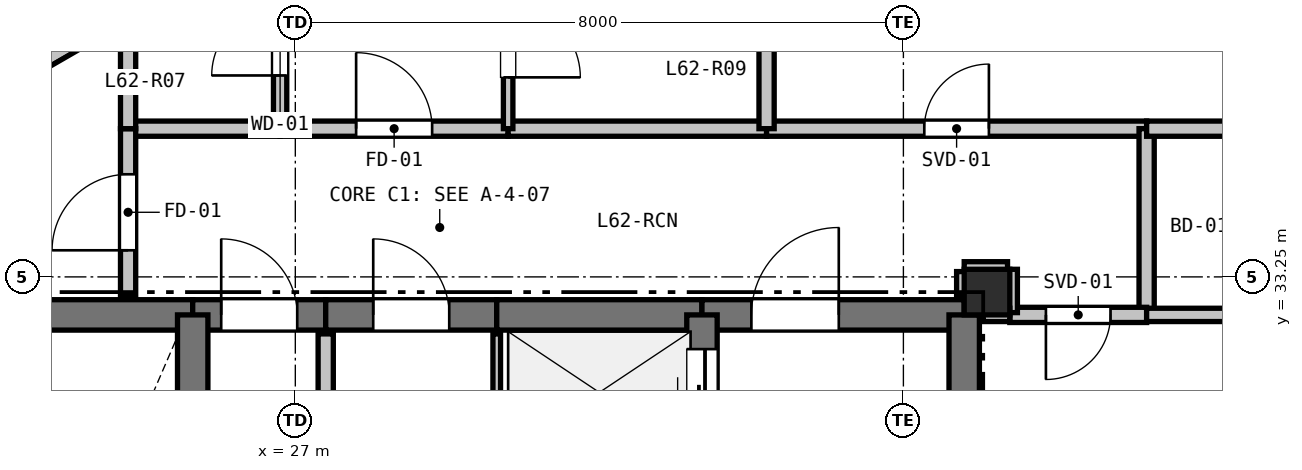
"""IFC4 building model, lengths in metres.
Left out: names, types, materials, properties, quantities, classifications, styles, units other than length and angle.
Written with IfcOpenShell. Run it as: python <this file> out.ifc"""

import sys

from ifc_helpers import new_model, si_unit, direction, frame, frame_2d, origin, origin_2d, place, context, subcontext, project, spatial, rectangle, extrude, element, fill, save


model = new_model("IFC4")
c1 = context("Model", 3, precision=1e-05, world=origin(), true_north=direction((0.0, 1.0)))
c2 = subcontext(c1, "Body", "Model", "MODEL_VIEW")
j1 = project(units=[si_unit("LENGTHUNIT", "METRE"), si_unit("PLANEANGLEUNIT", "RADIAN")], contexts=[c1])
p1 = place(None, origin())
s1 = spatial("IfcSite", under=j1, at=p1, CompositionType="ELEMENT")
p2 = place(p1, origin())
s2 = spatial("IfcBuilding", under=s1, at=p2, CompositionType="ELEMENT")
p3 = place(p2, frame((0.0, 0.0, 223.2)))
s3 = spatial("IfcBuildingStorey", under=s2, at=p3, CompositionType="ELEMENT", Elevation=223.2)
p4 = place(p3, frame((36.1, 33.05, 0.0), z_axis=(0.0, 0.0, 1.0), x_axis=(1.0, 0.0, 0.0)))
e1 = element("IfcColumn", 1, at=p4, inside=s3, PredefinedType="COLUMN", context=c2, shape_type="SweptSolid", body=[
    extrude(rectangle(XDim=0.6, YDim=0.6, at=origin_2d()), origin(), (0.0, 0.0, 1.0), 3.3),
])
p5 = place(p3, frame((20.066, 33.997, 0.0), z_axis=(0.0, 0.0, 1.0), x_axis=(0.866019557082, 0.500010126649, 0.0)))
e2 = element("IfcWall", 2, at=p5, inside=s3, PredefinedType="PARAPET", context=c2, shape_type="SweptSolid", body=[
    extrude(rectangle(XDim=8.228, YDim=0.2, at=frame_2d((4.114, 0.0))), origin(), (0.0, 0.0, 1.0), 0.2),
])
p6 = place(p3, frame((22.2, 32.75, 0.0), z_axis=(0.0, 0.0, 1.0), x_axis=(1.0, 0.0, 0.0)))
e3 = element("IfcWall", 3, at=p6, inside=s3, PredefinedType="SHEAR", context=c2, shape_type="SweptSolid", body=[
    extrude(rectangle(XDim=3.45, YDim=0.4, at=frame_2d((1.725, 0.0))), origin(), (0.0, 0.0, 1.0), 3.08),
])
p7 = place(p3, frame((25.65, 32.75, 0.0), z_axis=(0.0, 0.0, 1.0), x_axis=(1.0, 0.0, 0.0)))
e4 = element("IfcWall", 4, at=p7, inside=s3, PredefinedType="SHEAR", context=c2, shape_type="SweptSolid", body=[
    extrude(rectangle(XDim=1.75, YDim=0.4, at=frame_2d((0.875, 0.0))), origin(), (0.0, 0.0, 1.0), 3.08),
])
p8 = place(p7, frame((0.375, 0.0, 0.0)))
e5 = element("IfcOpeningElement", 5, at=p8, cuts=e4, PredefinedType="OPENING", context=c2, shape_type="SweptSolid", body=[
    extrude(rectangle(XDim=1.0, YDim=2.15, at=frame_2d((0.5, 1.075))), frame((0.0, 0.21, 0.0), z_axis=(0.0, -1.0, 0.0), x_axis=(1.0, 0.0, 0.0)), (0.0, 0.0, 1.0), 0.42),
])
p9 = place(p3, frame((27.4, 32.75, 0.0), z_axis=(0.0, 0.0, 1.0), x_axis=(1.0, 0.0, 0.0)))
e6 = element("IfcWall", 6, at=p9, inside=s3, PredefinedType="SHEAR", context=c2, shape_type="SweptSolid", body=[
    extrude(rectangle(XDim=2.25, YDim=0.4, at=frame_2d((1.125, 0.0))), origin(), (0.0, 0.0, 1.0), 3.08),
])
p10 = place(p9, frame((0.625, 0.0, 0.0)))
e7 = element("IfcOpeningElement", 7, at=p10, cuts=e6, PredefinedType="OPENING", context=c2, shape_type="SweptSolid", body=[
    extrude(rectangle(XDim=1.0, YDim=2.15, at=frame_2d((0.5, 1.075))), frame((0.0, 0.21, 0.0), z_axis=(0.0, -1.0, 0.0), x_axis=(1.0, 0.0, 0.0)), (0.0, 0.0, 1.0), 0.42),
])
p11 = place(p3, frame((29.65, 32.75, 0.0), z_axis=(0.0, 0.0, 1.0), x_axis=(1.0, 0.0, 0.0)))
e8 = element("IfcWall", 8, at=p11, inside=s3, PredefinedType="SHEAR", context=c2, shape_type="SweptSolid", body=[
    extrude(rectangle(XDim=2.7, YDim=0.4, at=frame_2d((1.35, 0.0))), origin(), (0.0, 0.0, 1.0), 3.08),
])
p12 = place(p3, frame((32.35, 32.75, 0.0), z_axis=(0.0, 0.0, 1.0), x_axis=(1.0, 0.0, 0.0)))
e9 = element("IfcWall", 9, at=p12, inside=s3, PredefinedType="SHEAR", context=c2, shape_type="SweptSolid", body=[
    extrude(rectangle(XDim=3.45, YDim=0.4, at=frame_2d((1.725, 0.0))), origin(), (0.0, 0.0, 1.0), 3.08),
])
p13 = place(p12, frame((0.65, 0.0, 0.0)))
e10 = element("IfcOpeningElement", 10, at=p13, cuts=e9, PredefinedType="OPENING", context=c2, shape_type="SweptSolid", body=[
    extrude(rectangle(XDim=1.15, YDim=2.15, at=frame_2d((0.575, 1.075))), frame((0.0, 0.21, 0.0), z_axis=(0.0, -1.0, 0.0), x_axis=(1.0, 0.0, 0.0)), (0.0, 0.0, 1.0), 0.42),
])
p14 = place(p3, frame((35.8, 32.75, 0.0), z_axis=(0.0, 0.0, 1.0), x_axis=(0.0, -1.0, 0.0)))
e11 = element("IfcWall", 11, at=p14, inside=s3, PredefinedType="SHEAR", context=c2, shape_type="SweptSolid", body=[
    extrude(rectangle(XDim=4.65, YDim=0.4, at=frame_2d((2.325, 0.0))), origin(), (0.0, 0.0, 1.0), 3.08),
])
p15 = place(p3, frame((25.65, 27.95, 0.0), z_axis=(0.0, 0.0, 1.0), x_axis=(0.0, 1.0, 0.0)))
e12 = element("IfcWall", 12, at=p15, inside=s3, PredefinedType="SHEAR", context=c2, shape_type="SweptSolid", body=[
    extrude(rectangle(XDim=4.8, YDim=0.4, at=frame_2d((2.4, 0.0))), origin(), (0.0, 0.0, 1.0), 3.08),
])
p16 = place(p3, frame((32.35, 30.75, 0.0), z_axis=(0.0, 0.0, 1.0), x_axis=(0.0, 1.0, 0.0)))
e13 = element("IfcWall", 13, at=p16, inside=s3, PredefinedType="SHEAR", context=c2, shape_type="SweptSolid", body=[
    extrude(rectangle(XDim=2.0, YDim=0.4, at=frame_2d((1.0, 0.0))), origin(), (0.0, 0.0, 1.0), 3.08),
])
p17 = place(p16, frame((0.45, 0.0, 0.0)))
e14 = element("IfcOpeningElement", 14, at=p17, cuts=e13, PredefinedType="OPENING", context=c2, shape_type="SweptSolid", body=[
    extrude(rectangle(XDim=1.1, YDim=2.15, at=frame_2d((0.55, 1.075))), frame((0.0, 0.21, 0.0), z_axis=(0.0, -1.0, 0.0), x_axis=(1.0, 0.0, 0.0)), (0.0, 0.0, 1.0), 0.42),
])
p18 = place(p3, frame((29.65, 30.3, 0.0), z_axis=(0.0, 0.0, 1.0), x_axis=(0.0, 1.0, 0.0)))
e15 = element("IfcWall", 15, at=p18, inside=s3, PredefinedType="PARTITIONING", context=c2, shape_type="SweptSolid", body=[
    extrude(rectangle(XDim=2.2, YDim=0.1, at=frame_2d((1.1, 0.0))), origin(), (0.0, 0.0, 1.0), 3.08),
])
p19 = place(p3, frame((27.4, 32.5, 0.0), z_axis=(0.0, 0.0, 1.0), x_axis=(0.0, -1.0, 0.0)))
e16 = element("IfcWall", 16, at=p19, inside=s3, PredefinedType="PARTITIONING", context=c2, shape_type="SweptSolid", body=[
    extrude(rectangle(XDim=4.55, YDim=0.2, at=frame_2d((2.275, 0.0))), origin(), (0.0, 0.0, 1.0), 3.08),
])
p20 = place(p19, frame((1.775, 0.0, 0.0)))
e17 = element("IfcOpeningElement", 17, at=p20, cuts=e16, PredefinedType="OPENING", context=c2, shape_type="SweptSolid", body=[
    extrude(rectangle(XDim=1.0, YDim=2.15, at=frame_2d((0.5, 1.075))), frame((0.0, 0.11, 0.0), z_axis=(0.0, -1.0, 0.0), x_axis=(1.0, 0.0, 0.0)), (0.0, 0.0, 1.0), 0.22),
])
p21 = place(p3, frame((24.8, 35.2, 0.0), z_axis=(0.0, 0.0, 1.0), x_axis=(1.0, 0.0, 0.0)))
e18 = element("IfcWall", 18, at=p21, inside=s3, PredefinedType="PARTITIONING", context=c2, shape_type="SweptSolid", body=[
    extrude(rectangle(XDim=2.0, YDim=0.2, at=frame_2d((1.0, 0.0))), origin(), (0.0, 0.0, 1.0), 3.08),
])
p22 = place(p3, frame((26.8, 35.2, 0.0), z_axis=(0.0, 0.0, 1.0), x_axis=(1.0, 0.0, 0.0)))
e19 = element("IfcWall", 19, at=p22, inside=s3, PredefinedType="PARTITIONING", context=c2, shape_type="SweptSolid", body=[
    extrude(rectangle(XDim=3.0, YDim=0.2, at=frame_2d((1.5, 0.0))), origin(), (0.0, 0.0, 1.0), 3.08),
])
p23 = place(p22, frame((1.0, 0.0, 0.0)))
e20 = element("IfcOpeningElement", 20, at=p23, cuts=e19, PredefinedType="OPENING", context=c2, shape_type="SweptSolid", body=[
    extrude(rectangle(XDim=1.0, YDim=2.15, at=frame_2d((0.5, 1.075))), frame((0.0, 0.11, 0.0), z_axis=(0.0, -1.0, 0.0), x_axis=(1.0, 0.0, 0.0)), (0.0, 0.0, 1.0), 0.22),
])
p24 = place(p3, frame((29.8, 35.2, 0.0), z_axis=(0.0, 0.0, 1.0), x_axis=(1.0, 0.0, 0.0)))
e21 = element("IfcWall", 21, at=p24, inside=s3, PredefinedType="PARTITIONING", context=c2, shape_type="SweptSolid", body=[
    extrude(rectangle(XDim=3.4, YDim=0.2, at=frame_2d((1.7, 0.0))), origin(), (0.0, 0.0, 1.0), 3.08),
])
p25 = place(p3, frame((33.2, 35.2, 0.0), z_axis=(0.0, 0.0, 1.0), x_axis=(1.0, 0.0, 0.0)))
e22 = element("IfcWall", 22, at=p25, inside=s3, PredefinedType="PARTITIONING", context=c2, shape_type="SweptSolid", body=[
    extrude(rectangle(XDim=5.0, YDim=0.2, at=frame_2d((2.5, 0.0))), origin(), (0.0, 0.0, 1.0), 2.528),
])
p26 = place(p25, frame((2.075, 0.0, 0.0)))
e23 = element("IfcOpeningElement", 23, at=p26, cuts=e22, PredefinedType="OPENING", context=c2, shape_type="SweptSolid", body=[
    extrude(rectangle(XDim=0.85, YDim=2.1, at=frame_2d((0.425, 1.05))), frame((0.0, 0.11, 0.0), z_axis=(0.0, -1.0, 0.0), x_axis=(1.0, 0.0, 0.0)), (0.0, 0.0, 1.0), 0.22),
])
p27 = place(p3, frame((38.2, 35.2, 0.0), z_axis=(0.0, 0.0, 1.0), x_axis=(0.0, -1.0, 0.0)))
e24 = element("IfcWall", 24, at=p27, inside=s3, PredefinedType="PARTITIONING", context=c2, shape_type="SweptSolid", body=[
    extrude(rectangle(XDim=2.45, YDim=0.2, at=frame_2d((1.225, 0.0))), origin(), (0.0, 0.0, 1.0), 3.08),
])
p28 = place(p3, frame((38.2, 32.75, 0.0), z_axis=(0.0, 0.0, 1.0), x_axis=(-1.0, 0.0, 0.0)))
e25 = element("IfcWall", 25, at=p28, inside=s3, PredefinedType="PARTITIONING", context=c2, shape_type="SweptSolid", body=[
    extrude(rectangle(XDim=1.8, YDim=0.2, at=frame_2d((0.9, 0.0))), origin(), (0.0, 0.0, 1.0), 3.08),
])
p29 = place(p28, frame((0.475, 0.0, 0.0)))
e26 = element("IfcOpeningElement", 26, at=p29, cuts=e25, PredefinedType="OPENING", context=c2, shape_type="SweptSolid", body=[
    extrude(rectangle(XDim=0.85, YDim=2.1, at=frame_2d((0.425, 1.05))), frame((0.0, 0.11, 0.0), z_axis=(0.0, -1.0, 0.0), x_axis=(1.0, 0.0, 0.0)), (0.0, 0.0, 1.0), 0.22),
])
for number, where, z_axis, x_axis in (
    (27, (36.4, 32.78, 0.0), (0.0, 0.0, 1.0), (0.0, 1.0, 0.0)),
    (28, (36.37, 33.35, 0.0), (0.0, 0.0, 1.0), (-1.0, 0.0, 0.0)),
):
    element("IfcWall", number, at=place(p3, frame(where, z_axis=z_axis, x_axis=x_axis)), inside=s3, PredefinedType="PARTITIONING", context=c2, shape_type="SweptSolid", body=[
        extrude(rectangle(XDim=0.57, YDim=0.2, at=frame_2d((0.285, 0.0))), origin(), (0.0, 0.0, 1.0), 2.528),
    ])
p30 = place(p3, frame((35.8, 33.32, 0.0), z_axis=(0.0, 0.0, 1.0), x_axis=(0.0, -1.0, 0.0)))
e29 = element("IfcWall", 29, at=p30, inside=s3, PredefinedType="PARTITIONING", context=c2, shape_type="SweptSolid", body=[
    extrude(rectangle(XDim=0.32, YDim=0.2, at=frame_2d((0.16, 0.0))), origin(), (0.0, 0.0, 1.0), 2.605),
])
p31 = place(p3, frame((24.8, 33.0, 0.0), z_axis=(0.0, 0.0, 1.0), x_axis=(0.0, 1.0, 0.0)))
e30 = element("IfcWall", 30, at=p31, inside=s3, PredefinedType="PARTITIONING", context=c2, shape_type="SweptSolid", body=[
    extrude(rectangle(XDim=2.2, YDim=0.2, at=frame_2d((1.1, 0.0))), origin(), (0.0, 0.0, 1.0), 2.605),
])
p32 = place(p31, frame((0.6, 0.0, 0.0)))
e31 = element("IfcOpeningElement", 31, at=p32, cuts=e30, PredefinedType="OPENING", context=c2, shape_type="SweptSolid", body=[
    extrude(rectangle(XDim=1.0, YDim=2.15, at=frame_2d((0.5, 1.075))), frame((0.0, 0.11, 0.0), z_axis=(0.0, -1.0, 0.0), x_axis=(1.0, 0.0, 0.0)), (0.0, 0.0, 1.0), 0.22),
])
p33 = place(p3, frame((29.8, 37.5, 0.0), z_axis=(0.0, 0.0, 1.0), x_axis=(0.0, -1.0, 0.0)))
e32 = element("IfcWall", 32, at=p33, inside=s3, PredefinedType="PARTITIONING", context=c2, shape_type="SweptSolid", body=[
    extrude(rectangle(XDim=2.3, YDim=0.125, at=frame_2d((1.15, 0.0))), origin(), (0.0, 0.0, 1.0), 3.08),
])
p34 = place(p33, frame((0.675, 0.0, 0.0)))
e33 = element("IfcOpeningElement", 33, at=p34, cuts=e32, PredefinedType="OPENING", context=c2, shape_type="SweptSolid", body=[
    extrude(rectangle(XDim=0.95, YDim=2.1, at=frame_2d((0.475, 1.05))), frame((0.0, 0.073, 0.0), z_axis=(0.0, -1.0, 0.0), x_axis=(1.0, 0.0, 0.0)), (0.0, 0.0, 1.0), 0.145),
])
p35 = place(p3, frame((26.8, 35.2, 0.0), z_axis=(0.0, 0.0, 1.0), x_axis=(0.0, 1.0, 0.0)))
e34 = element("IfcWall", 34, at=p35, inside=s3, PredefinedType="PLUMBINGWALL", context=c2, shape_type="SweptSolid", body=[
    extrude(rectangle(XDim=2.3, YDim=0.175, at=frame_2d((1.15, 0.0))), origin(), (0.0, 0.0, 1.0), 2.365),
])
p36 = place(p35, frame((0.7, 0.0, 0.0)))
e35 = element("IfcOpeningElement", 35, at=p36, cuts=e34, PredefinedType="OPENING", context=c2, shape_type="SweptSolid", body=[
    extrude(rectangle(XDim=0.9, YDim=2.1, at=frame_2d((0.45, 1.05))), frame((0.0, 0.097, 0.0), z_axis=(0.0, -1.0, 0.0), x_axis=(1.0, 0.0, 0.0)), (0.0, 0.0, 1.0), 0.195),
])
p37 = place(p3, frame((36.05, 32.75, 0.0), z_axis=(0.0, 0.0, 1.0), x_axis=(1.0, 0.0, 0.0)))
e36 = element("IfcWall", 36, at=p37, inside=s3, PredefinedType="PLUMBINGWALL", context=c2, shape_type="SweptSolid", body=[
    extrude(rectangle(XDim=0.35, YDim=0.175, at=frame_2d((0.175, 0.0))), origin(), (0.0, 0.0, 1.0), 2.605),
])
p38 = place(p3, frame((38.2, 32.75, 0.0), z_axis=(0.0, 0.0, 1.0), x_axis=(1.0, 0.0, 0.0)))
e37 = element("IfcWall", 37, at=p38, inside=s3, PredefinedType="PLUMBINGWALL", context=c2, shape_type="SweptSolid", body=[
    extrude(rectangle(XDim=1.406, YDim=0.175, at=frame_2d((0.703, 0.0))), origin(), (0.0, 0.0, 1.0), 2.365),
])
p39 = place(p3, frame((24.8, 35.2, 0.0), z_axis=(0.0, 0.0, 1.0), x_axis=(0.0, 1.0, 0.0)))
e38 = element("IfcWall", 38, at=p39, inside=s3, PredefinedType="PARTITIONING", context=c2, shape_type="SweptSolid", body=[
    extrude(rectangle(XDim=1.484, YDim=0.2, at=frame_2d((0.742, 0.0))), origin(), (0.0, 0.0, 1.0), 2.365),
])
p40 = place(p3, frame((33.2, 37.5, 0.0), z_axis=(0.0, 0.0, 1.0), x_axis=(0.0, -1.0, 0.0)))
e39 = element("IfcWall", 39, at=p40, inside=s3, PredefinedType="PARTITIONING", context=c2, shape_type="SweptSolid", body=[
    extrude(rectangle(XDim=2.3, YDim=0.2, at=frame_2d((1.15, 0.0))), origin(), (0.0, 0.0, 1.0), 3.08),
])
p41 = place(p3, frame((39.606, 35.2, 0.0), z_axis=(0.0, 0.0, 1.0), x_axis=(-1.0, 0.0, 0.0)))
e40 = element("IfcWall", 40, at=p41, inside=s3, PredefinedType="PARTITIONING", context=c2, shape_type="SweptSolid", body=[
    extrude(rectangle(XDim=1.406, YDim=0.2, at=frame_2d((0.703, 0.0))), origin(), (0.0, 0.0, 1.0), 2.365),
])
p42 = place(p8, origin())
e41 = element("IfcDoor", 41, at=p42, inside=s3, OperationType="SINGLE_SWING_LEFT", PredefinedType="DOOR", context=c2, shape_type="SweptSolid", body=[
    extrude(rectangle(XDim=1.0, YDim=2.15, at=frame_2d((0.5, 1.075))), frame((0.0, 0.025, 0.0), z_axis=(0.0, -1.0, 0.0), x_axis=(1.0, 0.0, 0.0)), (0.0, 0.0, 1.0), 0.05),
])
fill(e5, e41)
p43 = place(p17, origin())
e42 = element("IfcDoor", 42, at=p43, inside=s3, OperationType="SLIDING_TO_LEFT", PredefinedType="DOOR", context=c2, shape_type="SweptSolid", body=[
    extrude(rectangle(XDim=1.1, YDim=2.15, at=frame_2d((0.55, 1.075))), frame((0.0, 0.025, 0.0), z_axis=(0.0, -1.0, 0.0), x_axis=(1.0, 0.0, 0.0)), (0.0, 0.0, 1.0), 0.05),
])
fill(e14, e42)
p44 = place(p13, origin())
e43 = element("IfcDoor", 43, at=p44, inside=s3, OperationType="SINGLE_SWING_RIGHT", PredefinedType="DOOR", context=c2, shape_type="SweptSolid", body=[
    extrude(rectangle(XDim=1.15, YDim=2.15, at=frame_2d((0.575, 1.075))), frame((0.0, 0.025, 0.0), z_axis=(0.0, -1.0, 0.0), x_axis=(1.0, 0.0, 0.0)), (0.0, 0.0, 1.0), 0.05),
])
fill(e10, e43)
p45 = place(p23, origin())
e44 = element("IfcDoor", 44, at=p45, inside=s3, OperationType="SINGLE_SWING_LEFT", PredefinedType="DOOR", context=c2, shape_type="SweptSolid", body=[
    extrude(rectangle(XDim=1.0, YDim=2.15, at=frame_2d((0.5, 1.075))), frame((0.0, 0.025, 0.0), z_axis=(0.0, -1.0, 0.0), x_axis=(1.0, 0.0, 0.0)), (0.0, 0.0, 1.0), 0.05),
])
fill(e20, e44)
p46 = place(p29, origin())
e45 = element("IfcDoor", 45, at=p46, inside=s3, OperationType="SINGLE_SWING_RIGHT", PredefinedType="DOOR", context=c2, shape_type="SweptSolid", body=[
    extrude(rectangle(XDim=0.85, YDim=2.1, at=frame_2d((0.425, 1.05))), frame((0.0, 0.025, 0.0), z_axis=(0.0, -1.0, 0.0), x_axis=(1.0, 0.0, 0.0)), (0.0, 0.0, 1.0), 0.05),
])
fill(e26, e45)
p47 = place(p10, origin())
e46 = element("IfcDoor", 46, at=p47, inside=s3, OperationType="SINGLE_SWING_LEFT", PredefinedType="DOOR", context=c2, shape_type="SweptSolid", body=[
    extrude(rectangle(XDim=1.0, YDim=2.15, at=frame_2d((0.5, 1.075))), frame((0.0, 0.025, 0.0), z_axis=(0.0, -1.0, 0.0), x_axis=(1.0, 0.0, 0.0)), (0.0, 0.0, 1.0), 0.05),
])
fill(e7, e46)
p48 = place(p26, origin())
e47 = element("IfcDoor", 47, at=p48, inside=s3, OperationType="SINGLE_SWING_RIGHT", PredefinedType="DOOR", context=c2, shape_type="SweptSolid", body=[
    extrude(rectangle(XDim=0.85, YDim=2.1, at=frame_2d((0.425, 1.05))), frame((0.0, 0.025, 0.0), z_axis=(0.0, -1.0, 0.0), x_axis=(1.0, 0.0, 0.0)), (0.0, 0.0, 1.0), 0.05),
])
fill(e23, e47)
p49 = place(p32, origin())
e48 = element("IfcDoor", 48, at=p49, inside=s3, OperationType="SINGLE_SWING_LEFT", PredefinedType="DOOR", context=c2, shape_type="SweptSolid", body=[
    extrude(rectangle(XDim=1.0, YDim=2.15, at=frame_2d((0.5, 1.075))), frame((0.0, 0.025, 0.0), z_axis=(0.0, -1.0, 0.0), x_axis=(1.0, 0.0, 0.0)), (0.0, 0.0, 1.0), 0.05),
])
fill(e31, e48)
p50 = place(p36, origin())
e49 = element("IfcDoor", 49, at=p50, inside=s3, OperationType="SINGLE_SWING_LEFT", PredefinedType="DOOR", context=c2, shape_type="SweptSolid", body=[
    extrude(rectangle(XDim=0.9, YDim=2.1, at=frame_2d((0.45, 1.05))), frame((0.0, 0.025, 0.0), z_axis=(0.0, -1.0, 0.0), x_axis=(1.0, 0.0, 0.0)), (0.0, 0.0, 1.0), 0.05),
])
fill(e35, e49)
p51 = place(p34, origin())
e50 = element("IfcDoor", 50, at=p51, inside=s3, OperationType="SINGLE_SWING_RIGHT", PredefinedType="DOOR", context=c2, shape_type="SweptSolid", body=[
    extrude(rectangle(XDim=0.95, YDim=2.1, at=frame_2d((0.475, 1.05))), frame((0.0, 0.025, 0.0), z_axis=(0.0, -1.0, 0.0), x_axis=(1.0, 0.0, 0.0)), (0.0, 0.0, 1.0), 0.05),
])
fill(e33, e50)
save(model, sys.argv[1])
